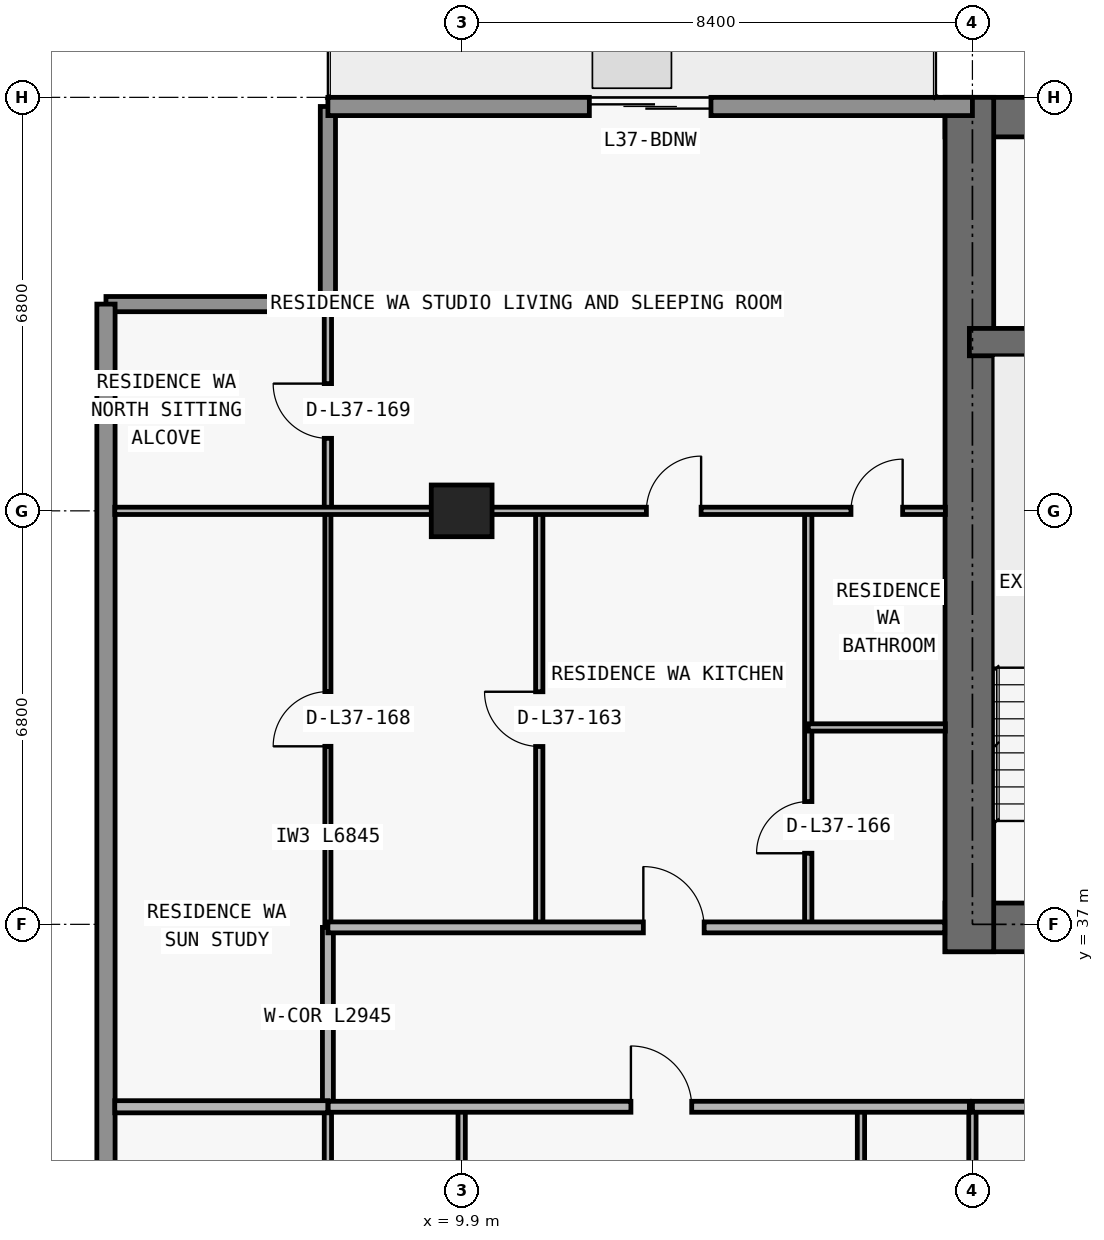
"""IFC4 building model, lengths in metres.
Left out: names, types, materials, properties, quantities, classifications, styles, units other than length and angle.
Written with IfcOpenShell. Run it as: python <this file> out.ifc"""

import sys

from ifc_helpers import new_model, si_unit, direction, frame, frame_2d, origin, origin_2d, place, context, subcontext, project, spatial, rectangle, extrude, element, fill, save


model = new_model("IFC4")
c1 = context("Model", 3, precision=1e-05, world=origin(), true_north=direction((0.0, 1.0)))
c2 = subcontext(c1, "Body", "Model", "MODEL_VIEW")
j1 = project(units=[si_unit("LENGTHUNIT", "METRE"), si_unit("PLANEANGLEUNIT", "RADIAN")], contexts=[c1])
p1 = place(None, origin())
s1 = spatial("IfcSite", under=j1, at=p1, CompositionType="ELEMENT")
p2 = place(p1, origin())
s2 = spatial("IfcBuilding", under=s1, at=p2, CompositionType="ELEMENT")
p3 = place(p2, frame((0.0, 0.0, 135.6)))
s3 = spatial("IfcBuildingStorey", under=s2, at=p3, CompositionType="ELEMENT", Elevation=135.6)
p4 = place(p3, frame((9.9, 43.8, 0.0), z_axis=(0.0, 0.0, 1.0), x_axis=(1.0, 0.0, 0.0)))
e1 = element("IfcColumn", 1, at=p4, inside=s3, PredefinedType="COLUMN", context=c2, shape_type="SweptSolid", body=[
    extrude(rectangle(XDim=1.0, YDim=0.85, at=origin_2d()), origin(), (0.0, 0.0, 1.0), 3.05),
])
p5 = place(p3, frame((17.85, 36.95, 0.0), z_axis=(0.0, 0.0, 1.0), x_axis=(1.0, 0.0, 0.0)))
e2 = element("IfcWall", 2, at=p5, inside=s3, PredefinedType="SHEAR", context=c2, shape_type="SweptSolid", body=[
    extrude(rectangle(XDim=42.1, YDim=0.8, at=frame_2d((21.05, 0.0))), origin(), (0.0, 0.0, 1.0), 3.05),
])
p6 = place(p5, frame((14.45, 0.0, 0.0)))
e3 = element("IfcOpeningElement", 3, at=p6, cuts=e2, PredefinedType="OPENING", context=c2, shape_type="SweptSolid", body=[
    extrude(rectangle(XDim=1.1, YDim=2.15, at=frame_2d((0.55, 1.075))), frame((0.0, 0.41, 0.0), z_axis=(0.0, -1.0, 0.0), x_axis=(1.0, 0.0, 0.0)), (0.0, 0.0, 1.0), 0.82),
])
p7 = place(p5, frame((6.3, 0.0, 0.0)))
e4 = element("IfcOpeningElement", 4, at=p7, cuts=e2, PredefinedType="OPENING", context=c2, shape_type="SweptSolid", body=[
    extrude(rectangle(XDim=1.05, YDim=2.15, at=frame_2d((0.525, 1.075))), frame((0.0, 0.41, 0.0), z_axis=(0.0, -1.0, 0.0), x_axis=(1.0, 0.0, 0.0)), (0.0, 0.0, 1.0), 0.82),
])
p8 = place(p5, frame((34.8, 0.0, 0.0)))
e5 = element("IfcOpeningElement", 5, at=p8, cuts=e2, PredefinedType="OPENING", context=c2, shape_type="SweptSolid", body=[
    extrude(rectangle(XDim=1.05, YDim=2.15, at=frame_2d((0.525, 1.075))), frame((0.0, 0.41, 0.0), z_axis=(0.0, -1.0, 0.0), x_axis=(1.0, 0.0, 0.0)), (0.0, 0.0, 1.0), 0.82),
])
p9 = place(p5, frame((10.913, 0.0, 0.0)))
e6 = element("IfcOpeningElement", 6, at=p9, cuts=e2, PredefinedType="OPENING", context=c2, shape_type="SweptSolid", body=[
    extrude(rectangle(XDim=1.05, YDim=2.15, at=frame_2d((0.525, 1.075))), frame((0.0, 0.41, 0.0), z_axis=(0.0, -1.0, 0.0), x_axis=(1.0, 0.0, 0.0)), (0.0, 0.0, 1.0), 0.82),
])
p10 = place(p5, frame((24.15, 0.0, 0.0)))
e7 = element("IfcOpeningElement", 7, at=p10, cuts=e2, PredefinedType="OPENING", context=c2, shape_type="SweptSolid", body=[
    extrude(rectangle(XDim=1.05, YDim=2.15, at=frame_2d((0.525, 1.075))), frame((0.0, 0.41, 0.0), z_axis=(0.0, -1.0, 0.0), x_axis=(1.0, 0.0, 0.0)), (0.0, 0.0, 1.0), 0.82),
])
p11 = place(p3, frame((17.85, 50.275, 0.0), z_axis=(0.0, 0.0, 1.0), x_axis=(1.0, 0.0, 0.0)))
e8 = element("IfcWall", 8, at=p11, inside=s3, PredefinedType="SHEAR", context=c2, shape_type="SweptSolid", body=[
    extrude(rectangle(XDim=42.1, YDim=0.65, at=frame_2d((21.05, 0.0))), origin(), (0.0, 0.0, 1.0), 3.05),
])
p12 = place(p3, frame((18.25, 36.55, 0.0), z_axis=(0.0, 0.0, 1.0), x_axis=(0.0, 1.0, 0.0)))
e9 = element("IfcWall", 9, at=p12, inside=s3, PredefinedType="SHEAR", context=c2, shape_type="SweptSolid", body=[
    extrude(rectangle(XDim=14.05, YDim=0.8, at=frame_2d((7.025, 0.0))), origin(), (0.0, 0.0, 1.0), 3.05),
])
p13 = place(p3, frame((18.25, 46.575, 0.0), z_axis=(0.0, 0.0, 1.0), x_axis=(1.0, 0.0, 0.0)))
e10 = element("IfcWall", 10, at=p13, inside=s3, PredefinedType="SHEAR", context=c2, shape_type="SweptSolid", body=[
    extrude(rectangle(XDim=41.3, YDim=0.45, at=frame_2d((20.65, 0.0))), origin(), (0.0, 0.0, 1.0), 3.05),
])
p14 = place(p13, frame((7.625, 0.0, 0.0)))
e11 = element("IfcOpeningElement", 11, at=p14, cuts=e10, PredefinedType="OPENING", context=c2, shape_type="SweptSolid", body=[
    extrude(rectangle(XDim=1.05, YDim=2.15, at=frame_2d((0.525, 1.075))), frame((0.0, 0.235, 0.0), z_axis=(0.0, -1.0, 0.0), x_axis=(1.0, 0.0, 0.0)), (0.0, 0.0, 1.0), 0.47),
])
p15 = place(p13, frame((32.675, 0.0, 0.0)))
e12 = element("IfcOpeningElement", 12, at=p15, cuts=e10, PredefinedType="OPENING", context=c2, shape_type="SweptSolid", body=[
    extrude(rectangle(XDim=1.05, YDim=2.15, at=frame_2d((0.525, 1.075))), frame((0.0, 0.235, 0.0), z_axis=(0.0, -1.0, 0.0), x_axis=(1.0, 0.0, 0.0)), (0.0, 0.0, 1.0), 0.47),
])
p16 = place(p3, frame((4.05, 47.2, 0.0), z_axis=(0.0, 0.0, 1.0), x_axis=(1.0, 0.0, 0.0)))
e13 = element("IfcWall", 13, at=p16, inside=s3, PredefinedType="ELEMENTEDWALL", context=c2, shape_type="SweptSolid", body=[
    extrude(rectangle(XDim=3.65, YDim=0.25, at=frame_2d((1.825, 0.0))), origin(), (0.0, 0.0, 1.0), 3.05),
])
p17 = place(p3, frame((7.7, 47.2, 0.0), z_axis=(0.0, 0.0, 1.0), x_axis=(0.0, 1.0, 0.0)))
e14 = element("IfcWall", 14, at=p17, inside=s3, PredefinedType="ELEMENTEDWALL", context=c2, shape_type="SweptSolid", body=[
    extrude(rectangle(XDim=3.25, YDim=0.25, at=frame_2d((1.625, 0.0))), origin(), (0.0, 0.0, 1.0), 3.05),
])
p18 = place(p3, frame((4.05, 28.0, 0.0), z_axis=(0.0, 0.0, 1.0), x_axis=(0.0, 1.0, 0.0)))
e15 = element("IfcWall", 15, at=p18, inside=s3, PredefinedType="STANDARD", context=c2, shape_type="SweptSolid", body=[
    extrude(rectangle(XDim=19.2, YDim=0.3, at=frame_2d((9.6, 0.0))), origin(), (0.0, 0.0, 1.0), 3.05),
])
p19 = place(p3, frame((7.7, 50.45, 0.0), z_axis=(0.0, 0.0, 1.0), x_axis=(1.0, 0.0, 0.0)))
e16 = element("IfcWall", 16, at=p19, inside=s3, PredefinedType="STANDARD", context=c2, shape_type="SweptSolid", body=[
    extrude(rectangle(XDim=10.6, YDim=0.3, at=frame_2d((5.3, 0.0))), origin(), (0.0, 0.0, 1.0), 3.05),
])
p20 = place(p19, frame((4.3, 0.0, 0.0)))
e17 = element("IfcOpeningElement", 17, at=p20, cuts=e16, PredefinedType="OPENING", context=c2, shape_type="SweptSolid", body=[
    extrude(rectangle(XDim=2.0, YDim=2.3, at=frame_2d((1.0, 1.15))), frame((0.0, 0.16, 0.0), z_axis=(0.0, -1.0, 0.0), x_axis=(1.0, 0.0, 0.0)), (0.0, 0.0, 1.0), 0.32),
])
p21 = place(p3, frame((7.7, 28.84, 0.0), z_axis=(0.0, 0.0, 1.0), x_axis=(0.0, 1.0, 0.0)))
e18 = element("IfcWall", 18, at=p21, inside=s3, PredefinedType="PARTITIONING", context=c2, shape_type="SweptSolid", body=[
    extrude(rectangle(XDim=5.16, YDim=0.12, at=frame_2d((2.58, 0.0))), origin(), (0.0, 0.0, 1.0), 3.05),
])
p22 = place(p3, frame((7.7, 34.005, 0.0), z_axis=(0.0, 0.0, 1.0), x_axis=(0.0, 1.0, 0.0)))
e19 = element("IfcWall", 19, at=p22, inside=s3, PredefinedType="PARTITIONING", context=c2, shape_type="SweptSolid", body=[
    extrude(rectangle(XDim=2.945, YDim=0.18, at=frame_2d((1.473, 0.0))), origin(), (0.0, 0.0, 1.0), 3.05),
])
p23 = place(p3, frame((7.7, 36.955, 0.0), z_axis=(0.0, 0.0, 1.0), x_axis=(0.0, 1.0, 0.0)))
e20 = element("IfcWall", 20, at=p23, inside=s3, PredefinedType="MOVABLE", context=c2, shape_type="SweptSolid", body=[
    extrude(rectangle(XDim=6.845, YDim=0.1, at=frame_2d((3.422, 0.0))), origin(), (0.0, 0.0, 1.0), 3.05),
])
p24 = place(p23, frame((2.972, 0.0, 0.0)))
e21 = element("IfcOpeningElement", 21, at=p24, cuts=e20, PredefinedType="OPENING", context=c2, shape_type="SweptSolid", body=[
    extrude(rectangle(XDim=0.9, YDim=2.15, at=frame_2d((0.45, 1.075))), frame((0.0, 0.06, 0.0), z_axis=(0.0, -1.0, 0.0), x_axis=(1.0, 0.0, 0.0)), (0.0, 0.0, 1.0), 0.12),
])
p25 = place(p3, frame((7.7, 43.805, 0.0), z_axis=(0.0, 0.0, 1.0), x_axis=(0.0, 1.0, 0.0)))
e22 = element("IfcWall", 22, at=p25, inside=s3, PredefinedType="PARTITIONING", context=c2, shape_type="SweptSolid", body=[
    extrude(rectangle(XDim=3.275, YDim=0.12, at=frame_2d((1.638, 0.0))), origin(), (0.0, 0.0, 1.0), 3.05),
])
p26 = place(p25, frame((1.188, 0.0, 0.0)))
e23 = element("IfcOpeningElement", 23, at=p26, cuts=e22, PredefinedType="OPENING", context=c2, shape_type="SweptSolid", body=[
    extrude(rectangle(XDim=0.9, YDim=2.15, at=frame_2d((0.45, 1.075))), frame((0.0, 0.07, 0.0), z_axis=(0.0, -1.0, 0.0), x_axis=(1.0, 0.0, 0.0)), (0.0, 0.0, 1.0), 0.14),
])
p27 = place(p3, frame((9.9, 28.84, 0.0), z_axis=(0.0, 0.0, 1.0), x_axis=(0.0, 1.0, 0.0)))
e24 = element("IfcWall", 24, at=p27, inside=s3, PredefinedType="PARTITIONING", context=c2, shape_type="SweptSolid", body=[
    extrude(rectangle(XDim=5.16, YDim=0.12, at=frame_2d((2.58, 0.0))), origin(), (0.0, 0.0, 1.0), 2.174),
])
p28 = place(p3, frame((11.176, 36.95, 0.0), z_axis=(0.0, 0.0, 1.0), x_axis=(0.0, 1.0, 0.0)))
e25 = element("IfcWall", 25, at=p28, inside=s3, PredefinedType="PARTITIONING", context=c2, shape_type="SweptSolid", body=[
    extrude(rectangle(XDim=6.85, YDim=0.12, at=frame_2d((3.425, 0.0))), origin(), (0.0, 0.0, 1.0), 3.05),
])
p29 = place(p28, frame((2.975, 0.0, 0.0)))
e26 = element("IfcOpeningElement", 26, at=p29, cuts=e25, PredefinedType="OPENING", context=c2, shape_type="SweptSolid", body=[
    extrude(rectangle(XDim=0.9, YDim=2.15, at=frame_2d((0.45, 1.075))), frame((0.0, 0.07, 0.0), z_axis=(0.0, -1.0, 0.0), x_axis=(1.0, 0.0, 0.0)), (0.0, 0.0, 1.0), 0.14),
])
p30 = place(p3, frame((15.6, 36.95, 0.0), z_axis=(0.0, 0.0, 1.0), x_axis=(0.0, 1.0, 0.0)))
e27 = element("IfcWall", 27, at=p30, inside=s3, PredefinedType="PARTITIONING", context=c2, shape_type="SweptSolid", body=[
    extrude(rectangle(XDim=6.85, YDim=0.12, at=frame_2d((3.425, 0.0))), origin(), (0.0, 0.0, 1.0), 3.05),
])
p31 = place(p30, frame((1.219, 0.0, 0.0)))
e28 = element("IfcOpeningElement", 28, at=p31, cuts=e27, PredefinedType="OPENING", context=c2, shape_type="SweptSolid", body=[
    extrude(rectangle(XDim=0.85, YDim=2.1, at=frame_2d((0.425, 1.05))), frame((0.0, 0.07, 0.0), z_axis=(0.0, -1.0, 0.0), x_axis=(1.0, 0.0, 0.0)), (0.0, 0.0, 1.0), 0.14),
])
p32 = place(p3, frame((16.467, 28.84, 0.0), z_axis=(0.0, 0.0, 1.0), x_axis=(0.0, 1.0, 0.0)))
e29 = element("IfcWall", 29, at=p32, inside=s3, PredefinedType="PARTITIONING", context=c2, shape_type="SweptSolid", body=[
    extrude(rectangle(XDim=5.16, YDim=0.12, at=frame_2d((2.58, 0.0))), origin(), (0.0, 0.0, 1.0), 2.679),
])
p33 = place(p32, frame((2.155, 0.0, 0.0)))
e30 = element("IfcOpeningElement", 30, at=p33, cuts=e29, PredefinedType="OPENING", context=c2, shape_type="SweptSolid", body=[
    extrude(rectangle(XDim=0.85, YDim=2.1, at=frame_2d((0.425, 1.05))), frame((0.0, 0.07, 0.0), z_axis=(0.0, -1.0, 0.0), x_axis=(1.0, 0.0, 0.0)), (0.0, 0.0, 1.0), 0.14),
])
p34 = place(p3, frame((18.3, 28.84, 0.0), z_axis=(0.0, 0.0, 1.0), x_axis=(0.0, 1.0, 0.0)))
e31 = element("IfcWall", 31, at=p34, inside=s3, PredefinedType="PARTITIONING", context=c2, shape_type="SweptSolid", body=[
    extrude(rectangle(XDim=5.16, YDim=0.12, at=frame_2d((2.58, 0.0))), origin(), (0.0, 0.0, 1.0), 2.174),
])
p35 = place(p3, frame((4.195, 34.0, 0.0), z_axis=(0.0, 0.0, 1.0), x_axis=(1.0, 0.0, 0.0)))
e32 = element("IfcWall", 32, at=p35, inside=s3, PredefinedType="PARTITIONING", context=c2, shape_type="SweptSolid", body=[
    extrude(rectangle(XDim=3.505, YDim=0.2, at=frame_2d((1.752, 0.0))), origin(), (0.0, 0.0, 1.0), 3.05),
])
p36 = place(p3, frame((7.705, 34.0, 0.0), z_axis=(0.0, 0.0, 1.0), x_axis=(1.0, 0.0, 0.0)))
e33 = element("IfcWall", 33, at=p36, inside=s3, PredefinedType="PARTITIONING", context=c2, shape_type="SweptSolid", body=[
    extrude(rectangle(XDim=10.545, YDim=0.18, at=frame_2d((5.272, 0.0))), origin(), (0.0, 0.0, 1.0), 3.05),
])
p37 = place(p36, frame((4.979, 0.0, 0.0)))
e34 = element("IfcOpeningElement", 34, at=p37, cuts=e33, PredefinedType="OPENING", context=c2, shape_type="SweptSolid", body=[
    extrude(rectangle(XDim=1.0, YDim=2.2, at=frame_2d((0.5, 1.1))), frame((0.0, 0.1, 0.0), z_axis=(0.0, -1.0, 0.0), x_axis=(1.0, 0.0, 0.0)), (0.0, 0.0, 1.0), 0.2),
])
p38 = place(p3, frame((18.3, 34.0, 0.0), z_axis=(0.0, 0.0, 1.0), x_axis=(1.0, 0.0, 0.0)))
e35 = element("IfcWall", 35, at=p38, inside=s3, PredefinedType="PARTITIONING", context=c2, shape_type="SweptSolid", body=[
    extrude(rectangle(XDim=37.586, YDim=0.18, at=frame_2d((18.793, 0.0))), origin(), (0.0, 0.0, 1.0), 3.05),
])
p39 = place(p38, frame((11.162, 0.0, 0.0)))
e36 = element("IfcOpeningElement", 36, at=p39, cuts=e35, PredefinedType="OPENING", context=c2, shape_type="SweptSolid", body=[
    extrude(rectangle(XDim=1.0, YDim=2.2, at=frame_2d((0.5, 1.1))), frame((0.0, 0.1, 0.0), z_axis=(0.0, -1.0, 0.0), x_axis=(1.0, 0.0, 0.0)), (0.0, 0.0, 1.0), 0.2),
])
p40 = place(p38, frame((34.693, 0.0, 0.0)))
e37 = element("IfcOpeningElement", 37, at=p40, cuts=e35, PredefinedType="OPENING", context=c2, shape_type="SweptSolid", body=[
    extrude(rectangle(XDim=1.0, YDim=2.2, at=frame_2d((0.5, 1.1))), frame((0.0, 0.1, 0.0), z_axis=(0.0, -1.0, 0.0), x_axis=(1.0, 0.0, 0.0)), (0.0, 0.0, 1.0), 0.2),
])
p41 = place(p3, frame((7.7, 36.95, 0.0), z_axis=(0.0, 0.0, 1.0), x_axis=(1.0, 0.0, 0.0)))
e38 = element("IfcWall", 38, at=p41, inside=s3, PredefinedType="PARTITIONING", context=c2, shape_type="SweptSolid", body=[
    extrude(rectangle(XDim=10.145, YDim=0.18, at=frame_2d((5.073, 0.0))), origin(), (0.0, 0.0, 1.0), 3.05),
])
p42 = place(p41, frame((5.188, 0.0, 0.0)))
e39 = element("IfcOpeningElement", 39, at=p42, cuts=e38, PredefinedType="OPENING", context=c2, shape_type="SweptSolid", body=[
    extrude(rectangle(XDim=1.0, YDim=2.2, at=frame_2d((0.5, 1.1))), frame((0.0, 0.1, 0.0), z_axis=(0.0, -1.0, 0.0), x_axis=(1.0, 0.0, 0.0)), (0.0, 0.0, 1.0), 0.2),
])
p43 = place(p3, frame((15.6, 40.238, 0.0), z_axis=(0.0, 0.0, 1.0), x_axis=(1.0, 0.0, 0.0)))
e40 = element("IfcWall", 40, at=p43, inside=s3, PredefinedType="PARTITIONING", context=c2, shape_type="SweptSolid", body=[
    extrude(rectangle(XDim=2.255, YDim=0.12, at=frame_2d((1.127, 0.0))), origin(), (0.0, 0.0, 1.0), 3.05),
])
p44 = place(p3, frame((4.195, 43.8, 0.0), z_axis=(0.0, 0.0, 1.0), x_axis=(1.0, 0.0, 0.0)))
e41 = element("IfcWall", 41, at=p44, inside=s3, PredefinedType="PARTITIONING", context=c2, shape_type="SweptSolid", body=[
    extrude(rectangle(XDim=13.66, YDim=0.12, at=frame_2d((6.83, 0.0))), origin(), (0.0, 0.0, 1.0), 2.339),
])
p45 = place(p44, frame((8.743, 0.0, 0.0)))
e42 = element("IfcOpeningElement", 42, at=p45, cuts=e41, PredefinedType="OPENING", context=c2, shape_type="SweptSolid", body=[
    extrude(rectangle(XDim=0.9, YDim=2.15, at=frame_2d((0.45, 1.075))), frame((0.0, 0.07, 0.0), z_axis=(0.0, -1.0, 0.0), x_axis=(1.0, 0.0, 0.0)), (0.0, 0.0, 1.0), 0.14),
])
p46 = place(p44, frame((12.107, 0.0, 0.0)))
e43 = element("IfcOpeningElement", 43, at=p46, cuts=e41, PredefinedType="OPENING", context=c2, shape_type="SweptSolid", body=[
    extrude(rectangle(XDim=0.85, YDim=2.1, at=frame_2d((0.425, 1.05))), frame((0.0, 0.07, 0.0), z_axis=(0.0, -1.0, 0.0), x_axis=(1.0, 0.0, 0.0)), (0.0, 0.0, 1.0), 0.14),
])
p47 = place(p20, origin())
e44 = element("IfcDoor", 44, at=p47, inside=s3, OperationType="DOUBLE_DOOR_SLIDING", PredefinedType="DOOR", context=c2, shape_type="SweptSolid", body=[
    extrude(rectangle(XDim=2.0, YDim=2.3, at=frame_2d((1.0, 1.15))), frame((0.0, 0.025, 0.0), z_axis=(0.0, -1.0, 0.0), x_axis=(1.0, 0.0, 0.0)), (0.0, 0.0, 1.0), 0.05),
])
fill(e17, e44)
p48 = place(p37, origin())
e45 = element("IfcDoor", 45, at=p48, inside=s3, OperationType="SINGLE_SWING_LEFT", PredefinedType="DOOR", context=c2, shape_type="SweptSolid", body=[
    extrude(rectangle(XDim=1.0, YDim=2.2, at=frame_2d((0.5, 1.1))), frame((0.0, 0.025, 0.0), z_axis=(0.0, -1.0, 0.0), x_axis=(1.0, 0.0, 0.0)), (0.0, 0.0, 1.0), 0.05),
])
fill(e34, e45)
p49 = place(p29, origin())
e46 = element("IfcDoor", 46, at=p49, inside=s3, OperationType="SINGLE_SWING_RIGHT", PredefinedType="DOOR", context=c2, shape_type="SweptSolid", body=[
    extrude(rectangle(XDim=0.9, YDim=2.15, at=frame_2d((0.45, 1.075))), frame((0.0, 0.025, 0.0), z_axis=(0.0, -1.0, 0.0), x_axis=(1.0, 0.0, 0.0)), (0.0, 0.0, 1.0), 0.05),
])
fill(e26, e46)
p50 = place(p42, origin())
e47 = element("IfcDoor", 47, at=p50, inside=s3, OperationType="SINGLE_SWING_LEFT", PredefinedType="DOOR", context=c2, shape_type="SweptSolid", body=[
    extrude(rectangle(XDim=1.0, YDim=2.2, at=frame_2d((0.5, 1.1))), frame((0.0, 0.025, 0.0), z_axis=(0.0, -1.0, 0.0), x_axis=(1.0, 0.0, 0.0)), (0.0, 0.0, 1.0), 0.05),
])
fill(e39, e47)
p51 = place(p45, origin())
e48 = element("IfcDoor", 48, at=p51, inside=s3, OperationType="SINGLE_SWING_RIGHT", PredefinedType="DOOR", context=c2, shape_type="SweptSolid", body=[
    extrude(rectangle(XDim=0.9, YDim=2.15, at=frame_2d((0.45, 1.075))), frame((0.0, 0.025, 0.0), z_axis=(0.0, -1.0, 0.0), x_axis=(1.0, 0.0, 0.0)), (0.0, 0.0, 1.0), 0.05),
])
fill(e42, e48)
p52 = place(p31, origin())
e49 = element("IfcDoor", 49, at=p52, inside=s3, OperationType="SINGLE_SWING_LEFT", PredefinedType="DOOR", context=c2, shape_type="SweptSolid", body=[
    extrude(rectangle(XDim=0.85, YDim=2.1, at=frame_2d((0.425, 1.05))), frame((0.0, 0.025, 0.0), z_axis=(0.0, -1.0, 0.0), x_axis=(1.0, 0.0, 0.0)), (0.0, 0.0, 1.0), 0.05),
])
fill(e28, e49)
p53 = place(p46, origin())
e50 = element("IfcDoor", 50, at=p53, inside=s3, OperationType="SINGLE_SWING_RIGHT", PredefinedType="DOOR", context=c2, shape_type="SweptSolid", body=[
    extrude(rectangle(XDim=0.85, YDim=2.1, at=frame_2d((0.425, 1.05))), frame((0.0, 0.025, 0.0), z_axis=(0.0, -1.0, 0.0), x_axis=(1.0, 0.0, 0.0)), (0.0, 0.0, 1.0), 0.05),
])
fill(e43, e50)
p54 = place(p24, origin())
e51 = element("IfcDoor", 51, at=p54, inside=s3, OperationType="SINGLE_SWING_LEFT", PredefinedType="DOOR", context=c2, shape_type="SweptSolid", body=[
    extrude(rectangle(XDim=0.9, YDim=2.15, at=frame_2d((0.45, 1.075))), frame((0.0, 0.025, 0.0), z_axis=(0.0, -1.0, 0.0), x_axis=(1.0, 0.0, 0.0)), (0.0, 0.0, 1.0), 0.05),
])
fill(e21, e51)
p55 = place(p26, origin())
e52 = element("IfcDoor", 52, at=p55, inside=s3, OperationType="SINGLE_SWING_RIGHT", PredefinedType="DOOR", context=c2, shape_type="SweptSolid", body=[
    extrude(rectangle(XDim=0.9, YDim=2.15, at=frame_2d((0.45, 1.075))), frame((0.0, 0.025, 0.0), z_axis=(0.0, -1.0, 0.0), x_axis=(1.0, 0.0, 0.0)), (0.0, 0.0, 1.0), 0.05),
])
fill(e23, e52)
save(model, sys.argv[1])
